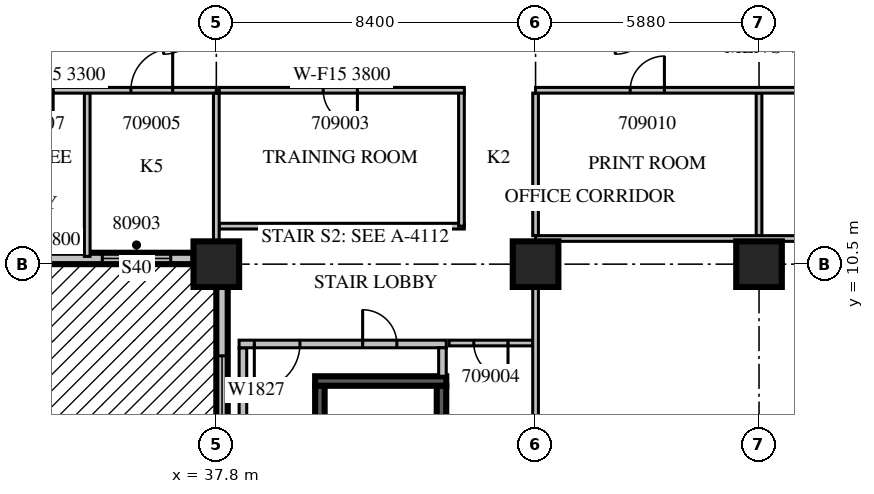
"""IFC4 building model, lengths in metres.
Left out: names, types, materials, properties, quantities, classifications, styles, units other than length and angle.
Written with IfcOpenShell. Run it as: python <this file> out.ifc"""

import sys

from ifc_helpers import new_model, si_unit, direction, frame, frame_2d, origin, origin_2d, place, context, subcontext, project, spatial, rectangle, extrude, source, transform, mapped, element, fill, save


model = new_model("IFC4")
c1 = context("Model", 3, precision=1e-05, world=origin(), true_north=direction((0.0, 1.0)))
c2 = subcontext(c1, "Body", "Model", "MODEL_VIEW")
j1 = project(units=[si_unit("LENGTHUNIT", "METRE"), si_unit("PLANEANGLEUNIT", "RADIAN")], contexts=[c1])
p1 = place(None, origin())
s1 = spatial("IfcSite", under=j1, at=p1, CompositionType="ELEMENT")
p2 = place(p1, origin())
s2 = spatial("IfcBuilding", under=s1, at=p2, CompositionType="ELEMENT")
p3 = place(p2, frame((0.0, 0.0, 48.9)))
s3 = spatial("IfcBuildingStorey", under=s2, at=p3, CompositionType="ELEMENT", Elevation=48.9)
m1 = source(origin(), c2, "Body", "SweptSolid", [
    extrude(rectangle(XDim=1.2, YDim=1.2, at=origin_2d()), origin(), (0.0, 0.0, 1.0), 4.2),
])
for number, where, z_axis, x_axis in (
    (1, (37.8, 10.5, 0.0), (0.0, 0.0, 1.0), (1.0, 0.0, 0.0)),
    (2, (46.2, 10.5, 0.0), (0.0, 0.0, 1.0), (1.0, 0.0, 0.0)),
    (3, (52.08, 10.5, 0.0), (0.0, 0.0, 1.0), (1.0, 0.0, 0.0)),
):
    element("IfcColumn", number, at=place(p3, frame(where, z_axis=z_axis, x_axis=x_axis)), inside=s3, PredefinedType="COLUMN", context=c2, shape_type="MappedRepresentation", body=[
        mapped(m1, transform((0.0, 0.0, 0.0), scale=1.0)),
    ])
p4 = place(p3, frame((30.0, 10.65, 0.0), z_axis=(0.0, 0.0, 1.0), x_axis=(1.0, 0.0, 0.0)))
e4 = element("IfcWall", 4, at=p4, inside=s3, PredefinedType="STANDARD", context=c2, shape_type="SweptSolid", body=[
    extrude(rectangle(XDim=7.2, YDim=0.3, at=frame_2d((3.6, 0.0))), origin(), (0.0, 0.0, 1.0), 2.8),
])
m2 = source(origin(), c2, "Body", "SweptSolid", [
    extrude(rectangle(XDim=1.8, YDim=2.4, at=frame_2d((0.9, 1.2))), frame((0.0, 0.16, 0.0), z_axis=(0.0, -1.0, 0.0), x_axis=(1.0, 0.0, 0.0)), (0.0, 0.0, 1.0), 0.32),
])
p5 = place(p4, frame((4.8, 0.0, 0.0)))
e5 = element("IfcOpeningElement", 5, at=p5, cuts=e4, PredefinedType="OPENING", context=c2, shape_type="MappedRepresentation", body=[
    mapped(m2, transform((0.0, 0.0, 0.0), scale=1.0)),
])
m3 = source(origin(), c2, "Body", "SweptSolid", [
    extrude(rectangle(XDim=8.7, YDim=0.3, at=frame_2d((4.35, 0.0))), origin(), (0.0, 0.0, 1.0), 3.8),
])
p6 = place(p3, frame((37.95, 9.9, 0.0), z_axis=(0.0, 0.0, 1.0), x_axis=(0.0, -1.0, 0.0)))
e6 = element("IfcWall", 6, at=p6, inside=s3, PredefinedType="STANDARD", context=c2, shape_type="MappedRepresentation", body=[
    mapped(m3, transform((0.0, 0.0, 0.0), scale=1.0)),
])
m4 = source(origin(), c2, "Body", "SweptSolid", [
    extrude(rectangle(XDim=1.8, YDim=2.7, at=frame_2d((0.9, 1.35))), frame((0.0, 0.16, 0.0), z_axis=(0.0, -1.0, 0.0), x_axis=(1.0, 0.0, 0.0)), (0.0, 0.0, 1.0), 0.32),
])
p7 = place(p6, frame((1.812, 0.0, 0.6)))
e7 = element("IfcOpeningElement", 7, at=p7, cuts=e6, PredefinedType="OPENING", context=c2, shape_type="MappedRepresentation", body=[
    mapped(m4, transform((0.0, 0.0, 0.0), scale=1.0)),
])
m5 = source(origin(), c2, "Body", "SweptSolid", [
    extrude(rectangle(XDim=2.4, YDim=2.7, at=frame_2d((1.2, 1.35))), frame((0.0, 0.16, 0.0), z_axis=(0.0, -1.0, 0.0), x_axis=(1.0, 0.0, 0.0)), (0.0, 0.0, 1.0), 0.32),
])
p8 = place(p6, frame((6.075, 0.0, 0.6)))
e8 = element("IfcOpeningElement", 8, at=p8, cuts=e6, PredefinedType="OPENING", context=c2, shape_type="MappedRepresentation", body=[
    mapped(m5, transform((0.0, 0.0, 0.0), scale=1.0)),
])
m6 = source(origin(), c2, "Body", "SweptSolid", [
    extrude(rectangle(XDim=7.0, YDim=0.25, at=frame_2d((3.5, 0.0))), origin(), (0.0, 0.0, 1.0), 3.8),
])
p9 = place(p3, frame((40.525, 0.3, 0.0), z_axis=(0.0, 0.0, 1.0), x_axis=(0.0, 1.0, 0.0)))
e9 = element("IfcWall", 9, at=p9, inside=s3, PredefinedType="SOLIDWALL", context=c2, shape_type="MappedRepresentation", body=[
    mapped(m6, transform((0.0, 0.0, 0.0), scale=1.0)),
])
m7 = source(origin(), c2, "Body", "SweptSolid", [
    extrude(rectangle(XDim=1.1, YDim=2.1, at=frame_2d((0.55, 1.05))), frame((0.0, 0.135, 0.0), z_axis=(0.0, -1.0, 0.0), x_axis=(1.0, 0.0, 0.0)), (0.0, 0.0, 1.0), 0.27),
])
p10 = place(p9, frame((0.55, 0.0, 0.0)))
e10 = element("IfcOpeningElement", 10, at=p10, cuts=e9, PredefinedType="OPENING", context=c2, shape_type="MappedRepresentation", body=[
    mapped(m7, transform((0.0, 0.0, 0.0), scale=1.0)),
])
p11 = place(p3, frame((43.725, 0.3, 0.0), z_axis=(0.0, 0.0, 1.0), x_axis=(0.0, 1.0, 0.0)))
e11 = element("IfcWall", 11, at=p11, inside=s3, PredefinedType="SOLIDWALL", context=c2, shape_type="MappedRepresentation", body=[
    mapped(m6, transform((0.0, 0.0, 0.0), scale=1.0)),
])
m8 = source(origin(), c2, "Body", "SweptSolid", [
    extrude(rectangle(XDim=3.45, YDim=0.25, at=frame_2d((1.725, 0.0))), origin(), (0.0, 0.0, 1.0), 3.8),
])
p12 = place(p3, frame((40.4, 7.425, 0.0), z_axis=(0.0, 0.0, 1.0), x_axis=(1.0, 0.0, 0.0)))
e12 = element("IfcWall", 12, at=p12, inside=s3, PredefinedType="SOLIDWALL", context=c2, shape_type="MappedRepresentation", body=[
    mapped(m8, transform((0.0, 0.0, 0.0), scale=1.0)),
])
m9 = source(origin(), c2, "Body", "SweptSolid", [
    extrude(rectangle(XDim=8.0, YDim=0.2, at=frame_2d((4.0, 0.0))), origin(), (0.0, 0.0, 1.0), 3.8),
])
p13 = place(p3, frame((38.5, 0.3, 0.0), z_axis=(0.0, 0.0, 1.0), x_axis=(0.0, 1.0, 0.0)))
e13 = element("IfcWall", 13, at=p13, inside=s3, PredefinedType="PARTITIONING", context=c2, shape_type="MappedRepresentation", body=[
    mapped(m9, transform((0.0, 0.0, 0.0), scale=1.0)),
])
m10 = source(origin(), c2, "Body", "SweptSolid", [
    extrude(rectangle(XDim=5.45, YDim=0.2, at=frame_2d((2.725, 0.0))), origin(), (0.0, 0.0, 1.0), 3.8),
])
p14 = place(p3, frame((38.4, 8.4, 0.0), z_axis=(0.0, 0.0, 1.0), x_axis=(1.0, 0.0, 0.0)))
e14 = element("IfcWall", 14, at=p14, inside=s3, PredefinedType="PARTITIONING", context=c2, shape_type="MappedRepresentation", body=[
    mapped(m10, transform((0.0, 0.0, 0.0), scale=1.0)),
])
m11 = source(origin(), c2, "Body", "SweptSolid", [
    extrude(rectangle(XDim=1.2, YDim=2.1, at=frame_2d((0.6, 1.05))), frame((0.0, 0.11, 0.0), z_axis=(0.0, -1.0, 0.0), x_axis=(1.0, 0.0, 0.0)), (0.0, 0.0, 1.0), 0.22),
])
p15 = place(p14, frame((0.4, 0.0, 0.0)))
e15 = element("IfcOpeningElement", 15, at=p15, cuts=e14, PredefinedType="OPENING", context=c2, shape_type="MappedRepresentation", body=[
    mapped(m11, transform((0.0, 0.0, 0.0), scale=1.0)),
])
m12 = source(origin(), c2, "Body", "SweptSolid", [
    extrude(rectangle(XDim=0.9, YDim=2.1, at=frame_2d((0.45, 1.05))), frame((0.0, 0.11, 0.0), z_axis=(0.0, -1.0, 0.0), x_axis=(1.0, 0.0, 0.0)), (0.0, 0.0, 1.0), 0.22),
])
p16 = place(p14, frame((3.25, 0.0, 0.0)))
e16 = element("IfcOpeningElement", 16, at=p16, cuts=e14, PredefinedType="OPENING", context=c2, shape_type="MappedRepresentation", body=[
    mapped(m12, transform((0.0, 0.0, 0.0), scale=1.0)),
])
m13 = source(origin(), c2, "Body", "SweptSolid", [
    extrude(rectangle(XDim=0.75, YDim=0.2, at=frame_2d((0.375, 0.0))), origin(), (0.0, 0.0, 1.0), 3.8),
])
p17 = place(p3, frame((43.75, 7.55, 0.0), z_axis=(0.0, 0.0, 1.0), x_axis=(0.0, 1.0, 0.0)))
e17 = element("IfcWall", 17, at=p17, inside=s3, PredefinedType="PARTITIONING", context=c2, shape_type="MappedRepresentation", body=[
    mapped(m13, transform((0.0, 0.0, 0.0), scale=1.0)),
])
m14 = source(origin(), c2, "Body", "SweptSolid", [
    extrude(rectangle(XDim=6.45, YDim=0.15, at=frame_2d((3.225, 0.0))), origin(), (0.0, 0.0, 1.0), 3.8),
])
p18 = place(p3, frame((37.875, 11.5, 0.0), z_axis=(0.0, 0.0, 1.0), x_axis=(1.0, 0.0, 0.0)))
e18 = element("IfcWall", 18, at=p18, inside=s3, PredefinedType="PARTITIONING", context=c2, shape_type="MappedRepresentation", body=[
    mapped(m14, transform((0.0, 0.0, 0.0), scale=1.0)),
])
m15 = source(origin(), c2, "Body", "SweptSolid", [
    extrude(rectangle(XDim=3.575, YDim=0.15, at=frame_2d((1.788, 0.0))), origin(), (0.0, 0.0, 1.0), 3.8),
])
p19 = place(p3, frame((44.25, 11.5, 0.0), z_axis=(0.0, 0.0, 1.0), x_axis=(0.0, 1.0, 0.0)))
e19 = element("IfcWall", 19, at=p19, inside=s3, PredefinedType="PARTITIONING", context=c2, shape_type="MappedRepresentation", body=[
    mapped(m15, transform((0.0, 0.0, 0.0), scale=1.0)),
])
p20 = place(p3, frame((44.325, 15.075, 0.0), z_axis=(0.0, 0.0, 1.0), x_axis=(-1.0, 0.0, 0.0)))
e20 = element("IfcWall", 20, at=p20, inside=s3, PredefinedType="PARTITIONING", context=c2, shape_type="MappedRepresentation", body=[
    mapped(m14, transform((0.0, 0.0, 0.0), scale=1.0)),
])
m16 = source(origin(), c2, "Body", "SweptSolid", [
    extrude(rectangle(XDim=0.9, YDim=2.1, at=frame_2d((0.45, 1.05))), frame((0.0, 0.085, 0.0), z_axis=(0.0, -1.0, 0.0), x_axis=(1.0, 0.0, 0.0)), (0.0, 0.0, 1.0), 0.17),
])
p21 = place(p20, frame((2.812, 0.0, 0.0)))
e21 = element("IfcOpeningElement", 21, at=p21, cuts=e20, PredefinedType="OPENING", context=c2, shape_type="MappedRepresentation", body=[
    mapped(m16, transform((0.0, 0.0, 0.0), scale=1.0)),
])
m17 = source(origin(), c2, "Body", "SweptSolid", [
    extrude(rectangle(XDim=2.2, YDim=0.15, at=frame_2d((1.1, 0.0))), origin(), (0.0, 0.0, 1.0), 3.8),
])
p22 = place(p3, frame((46.125, 8.425, 0.0), z_axis=(0.0, 0.0, 1.0), x_axis=(-1.0, 0.0, 0.0)))
e22 = element("IfcWall", 22, at=p22, inside=s3, PredefinedType="PARTITIONING", context=c2, shape_type="MappedRepresentation", body=[
    mapped(m17, transform((0.0, 0.0, 0.0), scale=1.0)),
])
p23 = place(p22, frame((0.65, 0.0, 0.0)))
e23 = element("IfcOpeningElement", 23, at=p23, cuts=e22, PredefinedType="OPENING", context=c2, shape_type="MappedRepresentation", body=[
    mapped(m16, transform((0.0, 0.0, 0.0), scale=1.0)),
])
m18 = source(origin(), c2, "Body", "SweptSolid", [
    extrude(rectangle(XDim=4.295, YDim=0.15, at=frame_2d((2.147, 0.0))), origin(), (0.0, 0.0, 1.0), 3.8),
])
p24 = place(p3, frame((34.403, 10.705, 0.0), z_axis=(0.0, 0.0, 1.0), x_axis=(0.0, 1.0, 0.0)))
e24 = element("IfcWall", 24, at=p24, inside=s3, PredefinedType="PARTITIONING", context=c2, shape_type="MappedRepresentation", body=[
    mapped(m18, transform((0.0, 0.0, 0.0), scale=1.0)),
])
m19 = source(origin(), c2, "Body", "SweptSolid", [
    extrude(rectangle(XDim=3.901, YDim=0.15, at=frame_2d((1.95, 0.0))), origin(), (0.0, 0.0, 1.0), 3.8),
])
p25 = place(p3, frame((37.8, 11.099, 0.0), z_axis=(0.0, 0.0, 1.0), x_axis=(0.0, 1.0, 0.0)))
e25 = element("IfcWall", 25, at=p25, inside=s3, PredefinedType="PARTITIONING", context=c2, shape_type="MappedRepresentation", body=[
    mapped(m19, transform((0.0, 0.0, 0.0), scale=1.0)),
])
m20 = source(origin(), c2, "Body", "SweptSolid", [
    extrude(rectangle(XDim=3.75, YDim=0.15, at=frame_2d((1.875, 0.0))), origin(), (0.0, 0.0, 1.0), 3.8),
])
p26 = place(p3, frame((52.08, 11.25, 0.0), z_axis=(0.0, 0.0, 1.0), x_axis=(0.0, 1.0, 0.0)))
e26 = element("IfcWall", 26, at=p26, inside=s3, PredefinedType="PARTITIONING", context=c2, shape_type="MappedRepresentation", body=[
    mapped(m20, transform((0.0, 0.0, 0.0), scale=1.0)),
])
m21 = source(origin(), c2, "Body", "SweptSolid", [
    extrude(rectangle(XDim=8.702, YDim=0.15, at=frame_2d((4.351, 0.0))), origin(), (0.0, 0.0, 1.0), 3.8),
])
p27 = place(p3, frame((46.2, 1.199, 0.0), z_axis=(0.0, 0.0, 1.0), x_axis=(0.0, 1.0, 0.0)))
e27 = element("IfcWall", 27, at=p27, inside=s3, PredefinedType="PARTITIONING", context=c2, shape_type="MappedRepresentation", body=[
    mapped(m21, transform((0.0, 0.0, 0.0), scale=1.0)),
])
p28 = place(p3, frame((46.2, 11.25, 0.0), z_axis=(0.0, 0.0, 1.0), x_axis=(0.0, 1.0, 0.0)))
e28 = element("IfcWall", 28, at=p28, inside=s3, PredefinedType="PARTITIONING", context=c2, shape_type="MappedRepresentation", body=[
    mapped(m20, transform((0.0, 0.0, 0.0), scale=1.0)),
])
m22 = source(origin(), c2, "Body", "SweptSolid", [
    extrude(rectangle(XDim=24.9, YDim=0.15, at=frame_2d((12.45, 0.0))), origin(), (0.0, 0.0, 1.0), 3.8),
])
p29 = place(p3, frame((71.1, 11.175, 0.0), z_axis=(0.0, 0.0, 1.0), x_axis=(-1.0, 0.0, 0.0)))
e29 = element("IfcWall", 29, at=p29, inside=s3, PredefinedType="PARTITIONING", context=c2, shape_type="MappedRepresentation", body=[
    mapped(m22, transform((0.0, 0.0, 0.0), scale=1.0)),
])
m23 = source(origin(), c2, "Body", "SweptSolid", [
    extrude(rectangle(XDim=1.1, YDim=2.1, at=frame_2d((0.55, 1.05))), frame((0.0, 0.085, 0.0), z_axis=(0.0, -1.0, 0.0), x_axis=(1.0, 0.0, 0.0)), (0.0, 0.0, 1.0), 0.17),
])
p30 = place(p29, frame((4.508, 0.0, 0.0)))
e30 = element("IfcOpeningElement", 30, at=p30, cuts=e29, PredefinedType="OPENING", context=c2, shape_type="MappedRepresentation", body=[
    mapped(m23, transform((0.0, 0.0, 0.0), scale=1.0)),
])
p31 = place(p29, frame((2.143, 0.0, 0.0)))
e31 = element("IfcOpeningElement", 31, at=p31, cuts=e29, PredefinedType="OPENING", context=c2, shape_type="MappedRepresentation", body=[
    mapped(m23, transform((0.0, 0.0, 0.0), scale=1.0)),
])
m24 = source(origin(), c2, "Body", "SweptSolid", [
    extrude(rectangle(XDim=8.4, YDim=0.15, at=frame_2d((4.2, 0.0))), origin(), (0.0, 0.0, 1.0), 3.3),
])
p32 = place(p3, frame((37.8, 15.075, 0.0), z_axis=(0.0, 0.0, 1.0), x_axis=(-1.0, 0.0, 0.0)))
e32 = element("IfcWall", 32, at=p32, inside=s3, PredefinedType="PARTITIONING", context=c2, shape_type="MappedRepresentation", body=[
    mapped(m24, transform((0.0, 0.0, 0.0), scale=1.0)),
])
p33 = place(p32, frame((1.149, 0.0, 0.0)))
e33 = element("IfcOpeningElement", 33, at=p33, cuts=e32, PredefinedType="OPENING", context=c2, shape_type="MappedRepresentation", body=[
    mapped(m23, transform((0.0, 0.0, 0.0), scale=1.0)),
])
p34 = place(p32, frame((6.795, 0.0, 0.0)))
e34 = element("IfcOpeningElement", 34, at=p34, cuts=e32, PredefinedType="OPENING", context=c2, shape_type="MappedRepresentation", body=[
    mapped(m16, transform((0.0, 0.0, 0.0), scale=1.0)),
])
p35 = place(p32, frame((4.293, 0.0, 0.0)))
e35 = element("IfcOpeningElement", 35, at=p35, cuts=e32, PredefinedType="OPENING", context=c2, shape_type="MappedRepresentation", body=[
    mapped(m16, transform((0.0, 0.0, 0.0), scale=1.0)),
])
p36 = place(p3, frame((71.1, 15.075, 0.0), z_axis=(0.0, 0.0, 1.0), x_axis=(-1.0, 0.0, 0.0)))
e36 = element("IfcWall", 36, at=p36, inside=s3, PredefinedType="PARTITIONING", context=c2, shape_type="MappedRepresentation", body=[
    mapped(m22, transform((0.0, 0.0, 0.0), scale=1.0)),
])
p37 = place(p36, frame((4.82, 0.0, 0.0)))
e37 = element("IfcOpeningElement", 37, at=p37, cuts=e36, PredefinedType="OPENING", context=c2, shape_type="MappedRepresentation", body=[
    mapped(m23, transform((0.0, 0.0, 0.0), scale=1.0)),
])
p38 = place(p36, frame((21.51, 0.0, 0.0)))
e38 = element("IfcOpeningElement", 38, at=p38, cuts=e36, PredefinedType="OPENING", context=c2, shape_type="MappedRepresentation", body=[
    mapped(m16, transform((0.0, 0.0, 0.0), scale=1.0)),
])
p39 = place(p36, frame((15.63, 0.0, 0.0)))
e39 = element("IfcOpeningElement", 39, at=p39, cuts=e36, PredefinedType="OPENING", context=c2, shape_type="MappedRepresentation", body=[
    mapped(m16, transform((0.0, 0.0, 0.0), scale=1.0)),
])
p40 = place(p36, frame((9.75, 0.0, 0.0)))
e40 = element("IfcOpeningElement", 40, at=p40, cuts=e36, PredefinedType="OPENING", context=c2, shape_type="MappedRepresentation", body=[
    mapped(m16, transform((0.0, 0.0, 0.0), scale=1.0)),
])
p41 = place(p36, frame((1.153, 0.0, 0.0)))
e41 = element("IfcOpeningElement", 41, at=p41, cuts=e36, PredefinedType="OPENING", context=c2, shape_type="MappedRepresentation", body=[
    mapped(m23, transform((0.0, 0.0, 0.0), scale=1.0)),
])
m25 = source(origin(), c2, "Body", "SweptSolid", [
    extrude(rectangle(XDim=1.8, YDim=2.4, at=frame_2d((0.9, 1.2))), frame((0.0, 0.025, 0.0), z_axis=(0.0, -1.0, 0.0), x_axis=(1.0, 0.0, 0.0)), (0.0, 0.0, 1.0), 0.05),
])
p42 = place(p5, origin())
e42 = element("IfcDoor", 42, at=p42, inside=s3, OperationType="SLIDING_TO_LEFT", PredefinedType="DOOR", context=c2, shape_type="MappedRepresentation", body=[
    mapped(m25, transform((0.0, 0.0, 0.0), scale=1.0)),
])
fill(e5, e42)
m26 = source(origin(), c2, "Body", "SweptSolid", [
    extrude(rectangle(XDim=1.8, YDim=2.7, at=frame_2d((0.9, 1.35))), frame((0.0, 0.03, 0.0), z_axis=(0.0, -1.0, 0.0), x_axis=(1.0, 0.0, 0.0)), (0.0, 0.0, 1.0), 0.06),
])
p43 = place(p7, origin())
e43 = element("IfcWindow", 43, at=p43, inside=s3, PartitioningType="SINGLE_PANEL", PredefinedType="WINDOW", context=c2, shape_type="MappedRepresentation", body=[
    mapped(m26, transform((0.0, 0.0, 0.0), scale=1.0)),
])
fill(e7, e43)
m27 = source(origin(), c2, "Body", "SweptSolid", [
    extrude(rectangle(XDim=1.2, YDim=2.1, at=frame_2d((0.6, 1.05))), frame((0.0, 0.025, 0.0), z_axis=(0.0, -1.0, 0.0), x_axis=(1.0, 0.0, 0.0)), (0.0, 0.0, 1.0), 0.05),
])
p44 = place(p15, origin())
e44 = element("IfcDoor", 44, at=p44, inside=s3, OperationType="SINGLE_SWING_RIGHT", PredefinedType="DOOR", context=c2, shape_type="MappedRepresentation", body=[
    mapped(m27, transform((0.0, 0.0, 0.0), scale=1.0)),
])
fill(e15, e44)
m28 = source(origin(), c2, "Body", "SweptSolid", [
    extrude(rectangle(XDim=0.9, YDim=2.1, at=frame_2d((0.45, 1.05))), frame((0.0, 0.025, 0.0), z_axis=(0.0, -1.0, 0.0), x_axis=(1.0, 0.0, 0.0)), (0.0, 0.0, 1.0), 0.05),
])
p45 = place(p16, origin())
e45 = element("IfcDoor", 45, at=p45, inside=s3, OperationType="SINGLE_SWING_LEFT", PredefinedType="DOOR", context=c2, shape_type="MappedRepresentation", body=[
    mapped(m28, transform((0.0, 0.0, 0.0), scale=1.0)),
])
fill(e16, e45)
p46 = place(p21, origin())
e46 = element("IfcDoor", 46, at=p46, inside=s3, OperationType="SINGLE_SWING_LEFT", PredefinedType="DOOR", context=c2, shape_type="MappedRepresentation", body=[
    mapped(m28, transform((0.0, 0.0, 0.0), scale=1.0)),
])
fill(e21, e46)
p47 = place(p23, origin())
e47 = element("IfcDoor", 47, at=p47, inside=s3, OperationType="SINGLE_SWING_LEFT", PredefinedType="DOOR", context=c2, shape_type="MappedRepresentation", body=[
    mapped(m28, transform((0.0, 0.0, 0.0), scale=1.0)),
])
fill(e23, e47)
m29 = source(origin(), c2, "Body", "SweptSolid", [
    extrude(rectangle(XDim=1.1, YDim=2.1, at=frame_2d((0.55, 1.05))), frame((0.0, 0.025, 0.0), z_axis=(0.0, -1.0, 0.0), x_axis=(1.0, 0.0, 0.0)), (0.0, 0.0, 1.0), 0.05),
])
p48 = place(p33, origin())
e48 = element("IfcDoor", 48, at=p48, inside=s3, OperationType="SINGLE_SWING_RIGHT", PredefinedType="DOOR", context=c2, shape_type="MappedRepresentation", body=[
    mapped(m29, transform((0.0, 0.0, 0.0), scale=1.0)),
])
fill(e33, e48)
p49 = place(p35, origin())
e49 = element("IfcDoor", 49, at=p49, inside=s3, OperationType="SINGLE_SWING_LEFT", PredefinedType="DOOR", context=c2, shape_type="MappedRepresentation", body=[
    mapped(m28, transform((0.0, 0.0, 0.0), scale=1.0)),
])
fill(e35, e49)
p50 = place(p38, origin())
e50 = element("IfcDoor", 50, at=p50, inside=s3, OperationType="SINGLE_SWING_RIGHT", PredefinedType="DOOR", context=c2, shape_type="MappedRepresentation", body=[
    mapped(m28, transform((0.0, 0.0, 0.0), scale=1.0)),
])
fill(e38, e50)
save(model, sys.argv[1])
